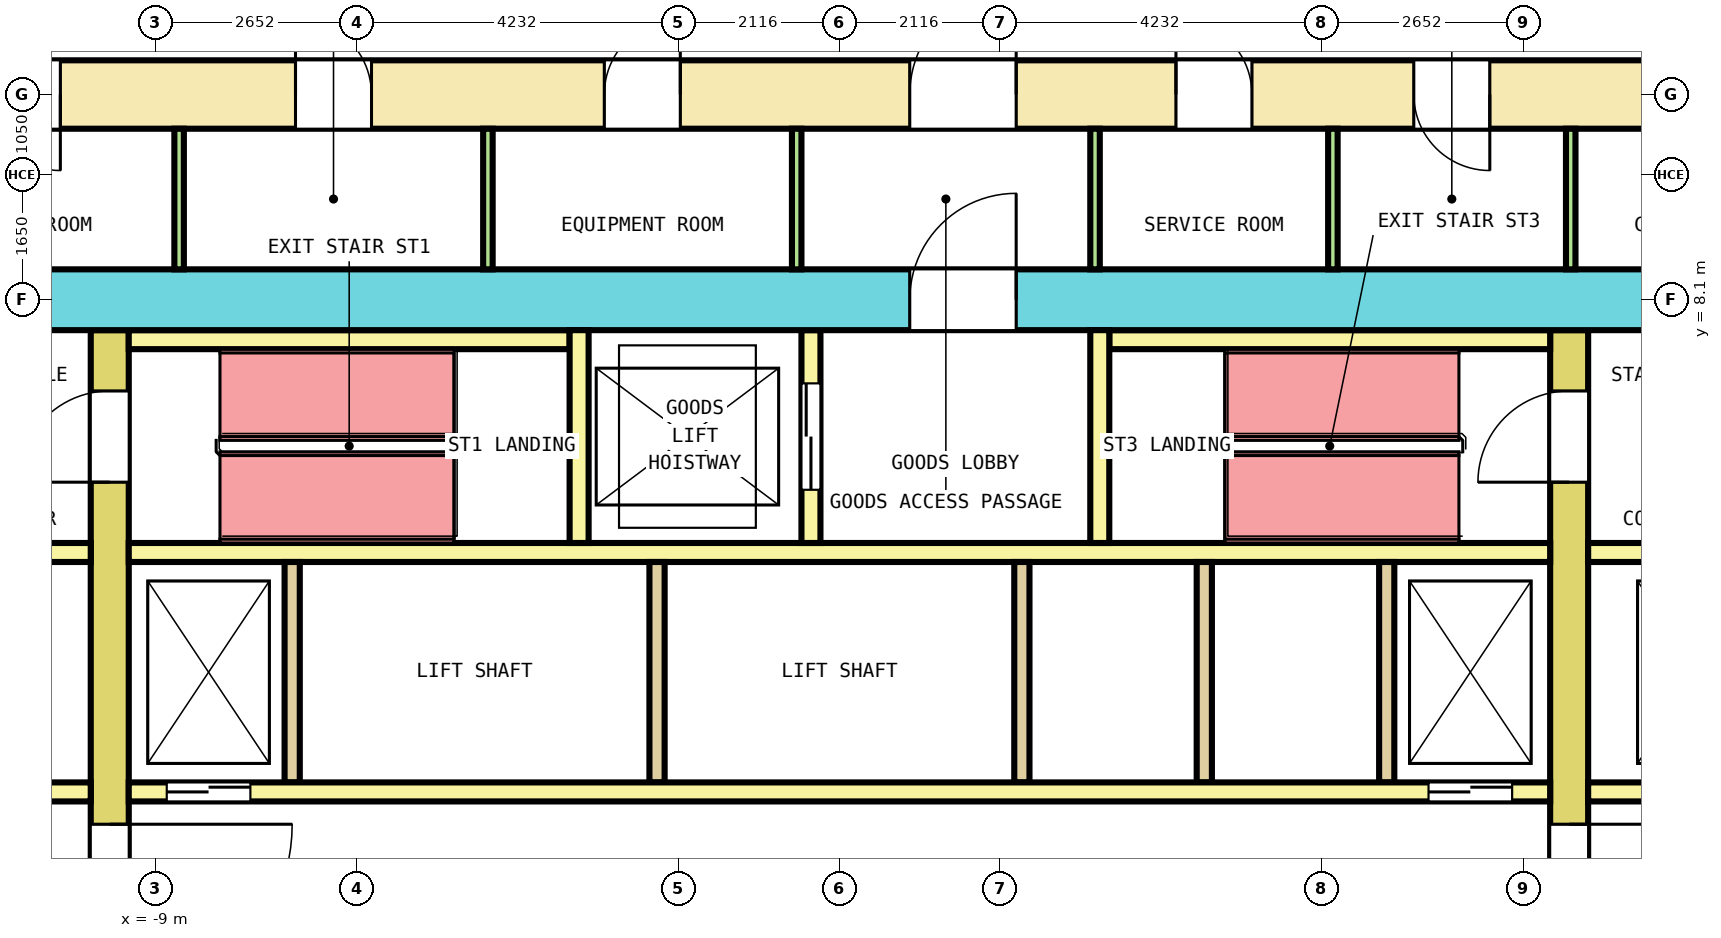
"""IFC4 building model, lengths in metres.
Left out: names, types, materials, properties, quantities, classifications, styles, units other than length and angle.
Written with IfcOpenShell. Run it as: python <this file> out.ifc"""

import sys

from ifc_helpers import new_model, si_unit, direction, frame, frame_2d, origin, place, context, subcontext, project, spatial, rectangle, extrude, element, fill, save


model = new_model("IFC4")
c1 = context("Model", 3, precision=1e-05, world=origin(), true_north=direction((0.0, 1.0)))
c2 = subcontext(c1, "Body", "Model", "MODEL_VIEW")
j1 = project(units=[si_unit("LENGTHUNIT", "METRE"), si_unit("PLANEANGLEUNIT", "RADIAN")], contexts=[c1])
p1 = place(None, origin())
s1 = spatial("IfcSite", under=j1, at=p1, CompositionType="ELEMENT")
p2 = place(p1, origin())
s2 = spatial("IfcBuilding", under=s1, at=p2, CompositionType="ELEMENT")
p3 = place(p2, frame((0.0, 0.0, 58.6)))
s3 = spatial("IfcBuildingStorey", under=s2, at=p3, CompositionType="ELEMENT", Elevation=58.6)
p4 = place(p3, frame((-13.65, 10.8, 0.0), z_axis=(0.0, 0.0, 1.0), x_axis=(1.0, 0.0, 0.0)))
e1 = element("IfcWall", 1, at=p4, inside=s3, PredefinedType="SHEAR", context=c2, shape_type="SweptSolid", body=[
    extrude(rectangle(XDim=27.3, YDim=0.9, at=frame_2d((13.65, 0.0))), origin(), (0.0, 0.0, 1.0), 4.1),
])
p5 = place(p4, frame((2.4, 0.0, 0.0)))
e2 = element("IfcOpeningElement", 2, at=p5, cuts=e1, PredefinedType="OPENING", context=c2, shape_type="SweptSolid", body=[
    extrude(rectangle(XDim=1.0, YDim=2.1, at=frame_2d((0.5, 1.05))), frame((0.0, 0.46, 0.0), z_axis=(0.0, -1.0, 0.0), x_axis=(1.0, 0.0, 0.0)), (0.0, 0.0, 1.0), 0.92),
])
p6 = place(p4, frame((6.494, 0.0, 0.0)))
e3 = element("IfcOpeningElement", 3, at=p6, cuts=e1, PredefinedType="OPENING", context=c2, shape_type="SweptSolid", body=[
    extrude(rectangle(XDim=1.0, YDim=2.1, at=frame_2d((0.5, 1.05))), frame((0.0, 0.46, 0.0), z_axis=(0.0, -1.0, 0.0), x_axis=(1.0, 0.0, 0.0)), (0.0, 0.0, 1.0), 0.92),
])
p7 = place(p4, frame((10.556, 0.0, 0.0)))
e4 = element("IfcOpeningElement", 4, at=p7, cuts=e1, PredefinedType="OPENING", context=c2, shape_type="SweptSolid", body=[
    extrude(rectangle(XDim=1.0, YDim=2.1, at=frame_2d((0.5, 1.05))), frame((0.0, 0.46, 0.0), z_axis=(0.0, -1.0, 0.0), x_axis=(1.0, 0.0, 0.0)), (0.0, 0.0, 1.0), 0.92),
])
p8 = place(p4, frame((18.077, 0.0, 0.0)))
e5 = element("IfcOpeningElement", 5, at=p8, cuts=e1, PredefinedType="OPENING", context=c2, shape_type="SweptSolid", body=[
    extrude(rectangle(XDim=1.0, YDim=2.1, at=frame_2d((0.5, 1.05))), frame((0.0, 0.46, 0.0), z_axis=(0.0, -1.0, 0.0), x_axis=(1.0, 0.0, 0.0)), (0.0, 0.0, 1.0), 0.92),
])
p9 = place(p4, frame((21.206, 0.0, 0.0)))
e6 = element("IfcOpeningElement", 6, at=p9, cuts=e1, PredefinedType="OPENING", context=c2, shape_type="SweptSolid", body=[
    extrude(rectangle(XDim=1.0, YDim=2.1, at=frame_2d((0.5, 1.05))), frame((0.0, 0.46, 0.0), z_axis=(0.0, -1.0, 0.0), x_axis=(1.0, 0.0, 0.0)), (0.0, 0.0, 1.0), 0.92),
])
p10 = place(p4, frame((24.367, 0.0, 0.0)))
e7 = element("IfcOpeningElement", 7, at=p10, cuts=e1, PredefinedType="OPENING", context=c2, shape_type="SweptSolid", body=[
    extrude(rectangle(XDim=1.0, YDim=2.1, at=frame_2d((0.5, 1.05))), frame((0.0, 0.46, 0.0), z_axis=(0.0, -1.0, 0.0), x_axis=(1.0, 0.0, 0.0)), (0.0, 0.0, 1.0), 0.92),
])
p11 = place(p4, frame((14.575, 0.0, 0.0)))
e8 = element("IfcOpeningElement", 8, at=p11, cuts=e1, PredefinedType="OPENING", context=c2, shape_type="SweptSolid", body=[
    extrude(rectangle(XDim=1.4, YDim=2.1, at=frame_2d((0.7, 1.05))), frame((0.0, 0.46, 0.0), z_axis=(0.0, -1.0, 0.0), x_axis=(1.0, 0.0, 0.0)), (0.0, 0.0, 1.0), 0.92),
])
p12 = place(p3, frame((-12.75, 8.1, 0.0), z_axis=(0.0, 0.0, 1.0), x_axis=(1.0, 0.0, 0.0)))
e9 = element("IfcWall", 9, at=p12, inside=s3, PredefinedType="SHEAR", context=c2, shape_type="SweptSolid", body=[
    extrude(rectangle(XDim=25.5, YDim=0.8, at=frame_2d((12.75, 0.0))), origin(), (0.0, 0.0, 1.0), 4.1),
])
p13 = place(p12, frame((13.675, 0.0, 0.0)))
e10 = element("IfcOpeningElement", 10, at=p13, cuts=e9, PredefinedType="OPENING", context=c2, shape_type="SweptSolid", body=[
    extrude(rectangle(XDim=1.4, YDim=2.1, at=frame_2d((0.7, 1.05))), frame((0.0, 0.41, 0.0), z_axis=(0.0, -1.0, 0.0), x_axis=(1.0, 0.0, 0.0)), (0.0, 0.0, 1.0), 0.82),
])
p14 = place(p3, frame((-9.6, -7.7, 0.0), z_axis=(0.0, 0.0, 1.0), x_axis=(0.0, 1.0, 0.0)))
e11 = element("IfcWall", 11, at=p14, inside=s3, PredefinedType="SHEAR", context=c2, shape_type="SweptSolid", body=[
    extrude(rectangle(XDim=15.4, YDim=0.5, at=frame_2d((7.7, 0.0))), origin(), (0.0, 0.0, 1.0), 4.1),
])
p15 = place(p14, frame((6.5, 0.0, 0.0)))
e12 = element("IfcOpeningElement", 12, at=p15, cuts=e11, PredefinedType="OPENING", context=c2, shape_type="SweptSolid", body=[
    extrude(rectangle(XDim=2.4, YDim=2.1, at=frame_2d((1.2, 1.05))), frame((0.0, 0.26, 0.0), z_axis=(0.0, -1.0, 0.0), x_axis=(1.0, 0.0, 0.0)), (0.0, 0.0, 1.0), 0.52),
])
p16 = place(p14, frame((13.4, 0.0, 0.0)))
e13 = element("IfcOpeningElement", 13, at=p16, cuts=e11, PredefinedType="OPENING", context=c2, shape_type="SweptSolid", body=[
    extrude(rectangle(XDim=1.2, YDim=2.1, at=frame_2d((0.6, 1.05))), frame((0.0, 0.26, 0.0), z_axis=(0.0, -1.0, 0.0), x_axis=(1.0, 0.0, 0.0)), (0.0, 0.0, 1.0), 0.52),
])
p17 = place(p14, frame((0.8, 0.0, 0.0)))
e14 = element("IfcOpeningElement", 14, at=p17, cuts=e11, PredefinedType="OPENING", context=c2, shape_type="SweptSolid", body=[
    extrude(rectangle(XDim=1.2, YDim=2.1, at=frame_2d((0.6, 1.05))), frame((0.0, 0.26, 0.0), z_axis=(0.0, -1.0, 0.0), x_axis=(1.0, 0.0, 0.0)), (0.0, 0.0, 1.0), 0.52),
])
p18 = place(p3, frame((9.6, -7.7, 0.0), z_axis=(0.0, 0.0, 1.0), x_axis=(0.0, 1.0, 0.0)))
e15 = element("IfcWall", 15, at=p18, inside=s3, PredefinedType="SHEAR", context=c2, shape_type="SweptSolid", body=[
    extrude(rectangle(XDim=15.4, YDim=0.5, at=frame_2d((7.7, 0.0))), origin(), (0.0, 0.0, 1.0), 4.1),
])
p19 = place(p18, frame((6.5, 0.0, 0.0)))
e16 = element("IfcOpeningElement", 16, at=p19, cuts=e15, PredefinedType="OPENING", context=c2, shape_type="SweptSolid", body=[
    extrude(rectangle(XDim=2.4, YDim=2.1, at=frame_2d((1.2, 1.05))), frame((0.0, 0.26, 0.0), z_axis=(0.0, -1.0, 0.0), x_axis=(1.0, 0.0, 0.0)), (0.0, 0.0, 1.0), 0.52),
])
p20 = place(p18, frame((13.4, 0.0, 0.0)))
e17 = element("IfcOpeningElement", 17, at=p20, cuts=e15, PredefinedType="OPENING", context=c2, shape_type="SweptSolid", body=[
    extrude(rectangle(XDim=1.2, YDim=2.1, at=frame_2d((0.6, 1.05))), frame((0.0, 0.26, 0.0), z_axis=(0.0, -1.0, 0.0), x_axis=(1.0, 0.0, 0.0)), (0.0, 0.0, 1.0), 0.52),
])
p21 = place(p18, frame((0.9, 0.0, 0.0)))
e18 = element("IfcOpeningElement", 18, at=p21, cuts=e15, PredefinedType="OPENING", context=c2, shape_type="SweptSolid", body=[
    extrude(rectangle(XDim=1.0, YDim=2.1, at=frame_2d((0.5, 1.05))), frame((0.0, 0.26, 0.0), z_axis=(0.0, -1.0, 0.0), x_axis=(1.0, 0.0, 0.0)), (0.0, 0.0, 1.0), 0.52),
])
p22 = place(p3, frame((-12.75, 1.625, 0.0), z_axis=(0.0, 0.0, 1.0), x_axis=(1.0, 0.0, 0.0)))
e19 = element("IfcWall", 19, at=p22, inside=s3, PredefinedType="SOLIDWALL", context=c2, shape_type="SweptSolid", body=[
    extrude(rectangle(XDim=2.9, YDim=0.25, at=frame_2d((1.45, 0.0))), origin(), (0.0, 0.0, 1.0), 4.1),
])
p23 = place(p22, frame((0.9, 0.0, 0.0)))
e20 = element("IfcOpeningElement", 20, at=p23, cuts=e19, PredefinedType="OPENING", context=c2, shape_type="SweptSolid", body=[
    extrude(rectangle(XDim=1.1, YDim=2.1, at=frame_2d((0.55, 1.05))), frame((0.0, 0.135, 0.0), z_axis=(0.0, -1.0, 0.0), x_axis=(1.0, 0.0, 0.0)), (0.0, 0.0, 1.0), 0.27),
])
p24 = place(p3, frame((-9.35, 1.625, 0.0), z_axis=(0.0, 0.0, 1.0), x_axis=(1.0, 0.0, 0.0)))
e21 = element("IfcWall", 21, at=p24, inside=s3, PredefinedType="SOLIDWALL", context=c2, shape_type="SweptSolid", body=[
    extrude(rectangle(XDim=18.7, YDim=0.25, at=frame_2d((9.35, 0.0))), origin(), (0.0, 0.0, 1.0), 4.1),
])
p25 = place(p24, frame((0.5, 0.0, 0.0)))
e22 = element("IfcOpeningElement", 22, at=p25, cuts=e21, PredefinedType="OPENING", context=c2, shape_type="SweptSolid", body=[
    extrude(rectangle(XDim=1.1, YDim=2.1, at=frame_2d((0.55, 1.05))), frame((0.0, 0.135, 0.0), z_axis=(0.0, -1.0, 0.0), x_axis=(1.0, 0.0, 0.0)), (0.0, 0.0, 1.0), 0.27),
])
p26 = place(p24, frame((17.1, 0.0, 0.0)))
e23 = element("IfcOpeningElement", 23, at=p26, cuts=e21, PredefinedType="OPENING", context=c2, shape_type="SweptSolid", body=[
    extrude(rectangle(XDim=1.1, YDim=2.1, at=frame_2d((0.55, 1.05))), frame((0.0, 0.135, 0.0), z_axis=(0.0, -1.0, 0.0), x_axis=(1.0, 0.0, 0.0)), (0.0, 0.0, 1.0), 0.27),
])
p27 = place(p3, frame((9.85, 1.625, 0.0), z_axis=(0.0, 0.0, 1.0), x_axis=(1.0, 0.0, 0.0)))
e24 = element("IfcWall", 24, at=p27, inside=s3, PredefinedType="SOLIDWALL", context=c2, shape_type="SweptSolid", body=[
    extrude(rectangle(XDim=2.9, YDim=0.25, at=frame_2d((1.45, 0.0))), origin(), (0.0, 0.0, 1.0), 4.1),
])
p28 = place(p27, frame((0.9, 0.0, 0.0)))
e25 = element("IfcOpeningElement", 25, at=p28, cuts=e24, PredefinedType="OPENING", context=c2, shape_type="SweptSolid", body=[
    extrude(rectangle(XDim=1.1, YDim=2.1, at=frame_2d((0.55, 1.05))), frame((0.0, 0.135, 0.0), z_axis=(0.0, -1.0, 0.0), x_axis=(1.0, 0.0, 0.0)), (0.0, 0.0, 1.0), 0.27),
])
p29 = place(p3, frame((-12.75, 4.775, 0.0), z_axis=(0.0, 0.0, 1.0), x_axis=(1.0, 0.0, 0.0)))
e26 = element("IfcWall", 26, at=p29, inside=s3, PredefinedType="SOLIDWALL", context=c2, shape_type="SweptSolid", body=[
    extrude(rectangle(XDim=2.9, YDim=0.25, at=frame_2d((1.45, 0.0))), origin(), (0.0, 0.0, 1.0), 4.1),
])
p30 = place(p3, frame((-9.35, 4.775, 0.0), z_axis=(0.0, 0.0, 1.0), x_axis=(1.0, 0.0, 0.0)))
e27 = element("IfcWall", 27, at=p30, inside=s3, PredefinedType="SOLIDWALL", context=c2, shape_type="SweptSolid", body=[
    extrude(rectangle(XDim=18.7, YDim=0.25, at=frame_2d((9.35, 0.0))), origin(), (0.0, 0.0, 1.0), 4.1),
])
p31 = place(p3, frame((9.85, 4.775, 0.0), z_axis=(0.0, 0.0, 1.0), x_axis=(1.0, 0.0, 0.0)))
e28 = element("IfcWall", 28, at=p31, inside=s3, PredefinedType="SOLIDWALL", context=c2, shape_type="SweptSolid", body=[
    extrude(rectangle(XDim=2.9, YDim=0.25, at=frame_2d((1.45, 0.0))), origin(), (0.0, 0.0, 1.0), 4.1),
])
for number, where, z_axis, x_axis in (
    (29, (-7.2, 1.75, 0.0), (0.0, 0.0, 1.0), (0.0, 1.0, 0.0)),
    (30, (-2.4, 1.75, 0.0), (0.0, 0.0, 1.0), (0.0, 1.0, 0.0)),
    (31, (2.4, 1.75, 0.0), (0.0, 0.0, 1.0), (0.0, 1.0, 0.0)),
    (32, (4.8, 1.75, 0.0), (0.0, 0.0, 1.0), (0.0, 1.0, 0.0)),
    (33, (7.2, 1.75, 0.0), (0.0, 0.0, 1.0), (0.0, 1.0, 0.0)),
):
    element("IfcWall", number, at=place(p3, frame(where, z_axis=z_axis, x_axis=x_axis)), inside=s3, PredefinedType="SOLIDWALL", context=c2, shape_type="SweptSolid", body=[
        extrude(rectangle(XDim=2.9, YDim=0.2, at=frame_2d((1.45, 0.0))), origin(), (0.0, 0.0, 1.0), 4.1),
    ])
for number, where, z_axis, x_axis in (
    (34, (-9.35, 7.575, 0.0), (0.0, 0.0, 1.0), (1.0, 0.0, 0.0)),
    (35, (3.55, 7.575, 0.0), (0.0, 0.0, 1.0), (1.0, 0.0, 0.0)),
):
    element("IfcWall", number, at=place(p3, frame(where, z_axis=z_axis, x_axis=x_axis)), inside=s3, PredefinedType="SOLIDWALL", context=c2, shape_type="SweptSolid", body=[
        extrude(rectangle(XDim=5.8, YDim=0.25, at=frame_2d((2.9, 0.0))), origin(), (0.0, 0.0, 1.0), 4.1),
    ])
p32 = place(p3, frame((-3.425, 4.9, 0.0), z_axis=(0.0, 0.0, 1.0), x_axis=(0.0, 1.0, 0.0)))
e36 = element("IfcWall", 36, at=p32, inside=s3, PredefinedType="SOLIDWALL", context=c2, shape_type="SweptSolid", body=[
    extrude(rectangle(XDim=2.8, YDim=0.25, at=frame_2d((1.4, 0.0))), origin(), (0.0, 0.0, 1.0), 4.1),
])
p33 = place(p3, frame((-0.375, 4.9, 0.0), z_axis=(0.0, 0.0, 1.0), x_axis=(0.0, 1.0, 0.0)))
e37 = element("IfcWall", 37, at=p33, inside=s3, PredefinedType="SOLIDWALL", context=c2, shape_type="SweptSolid", body=[
    extrude(rectangle(XDim=2.8, YDim=0.25, at=frame_2d((1.4, 0.0))), origin(), (0.0, 0.0, 1.0), 4.1),
])
p34 = place(p33, frame((0.7, 0.0, 0.0)))
e38 = element("IfcOpeningElement", 38, at=p34, cuts=e37, PredefinedType="OPENING", context=c2, shape_type="SweptSolid", body=[
    extrude(rectangle(XDim=1.4, YDim=2.1, at=frame_2d((0.7, 1.05))), frame((0.0, 0.135, 0.0), z_axis=(0.0, -1.0, 0.0), x_axis=(1.0, 0.0, 0.0)), (0.0, 0.0, 1.0), 0.27),
])
p35 = place(p3, frame((3.425, 4.9, 0.0), z_axis=(0.0, 0.0, 1.0), x_axis=(0.0, 1.0, 0.0)))
e39 = element("IfcWall", 39, at=p35, inside=s3, PredefinedType="SOLIDWALL", context=c2, shape_type="SweptSolid", body=[
    extrude(rectangle(XDim=2.8, YDim=0.25, at=frame_2d((1.4, 0.0))), origin(), (0.0, 0.0, 1.0), 4.1),
])
for number, where, z_axis, x_axis in (
    (40, (-8.688, 8.5, 0.0), (0.0, 0.0, 1.0), (0.0, 1.0, 0.0)),
    (41, (-4.625, 8.5, 0.0), (0.0, 0.0, 1.0), (0.0, 1.0, 0.0)),
    (42, (-0.562, 8.5, 0.0), (0.0, 0.0, 1.0), (0.0, 1.0, 0.0)),
    (43, (3.363, 8.5, 0.0), (0.0, 0.0, 1.0), (0.0, 1.0, 0.0)),
    (44, (6.492, 8.5, 0.0), (0.0, 0.0, 1.0), (0.0, 1.0, 0.0)),
    (45, (9.621, 8.5, 0.0), (0.0, 0.0, 1.0), (0.0, 1.0, 0.0)),
):
    element("IfcWall", number, at=place(p3, frame(where, z_axis=z_axis, x_axis=x_axis)), inside=s3, PredefinedType="PARTITIONING", context=c2, shape_type="SweptSolid", body=[
        extrude(rectangle(XDim=1.85, YDim=0.125, at=frame_2d((0.925, 0.0))), origin(), (0.0, 0.0, 1.0), 4.1),
    ])
p36 = place(p25, origin())
e46 = element("IfcDoor", 46, at=p36, inside=s3, OperationType="DOUBLE_DOOR_SLIDING", PredefinedType="DOOR", context=c2, shape_type="SweptSolid", body=[
    extrude(rectangle(XDim=1.1, YDim=2.1, at=frame_2d((0.55, 1.05))), frame((0.0, 0.075, 0.0), z_axis=(0.0, -1.0, 0.0), x_axis=(1.0, 0.0, 0.0)), (0.0, 0.0, 1.0), 0.15),
])
fill(e22, e46)
p37 = place(p26, origin())
e47 = element("IfcDoor", 47, at=p37, inside=s3, OperationType="DOUBLE_DOOR_SLIDING", PredefinedType="DOOR", context=c2, shape_type="SweptSolid", body=[
    extrude(rectangle(XDim=1.1, YDim=2.1, at=frame_2d((0.55, 1.05))), frame((0.0, 0.075, 0.0), z_axis=(0.0, -1.0, 0.0), x_axis=(1.0, 0.0, 0.0)), (0.0, 0.0, 1.0), 0.15),
])
fill(e23, e47)
p38 = place(p34, origin())
e48 = element("IfcDoor", 48, at=p38, inside=s3, OperationType="DOUBLE_DOOR_SLIDING", PredefinedType="DOOR", context=c2, shape_type="SweptSolid", body=[
    extrude(rectangle(XDim=1.4, YDim=2.1, at=frame_2d((0.7, 1.05))), frame((0.0, 0.075, 0.0), z_axis=(0.0, -1.0, 0.0), x_axis=(1.0, 0.0, 0.0)), (0.0, 0.0, 1.0), 0.15),
])
fill(e38, e48)
p39 = place(p15, origin())
e49 = element("IfcDoor", 49, at=p39, inside=s3, OperationType="DOUBLE_DOOR_SINGLE_SWING", PredefinedType="DOOR", context=c2, shape_type="SweptSolid", body=[
    extrude(rectangle(XDim=2.4, YDim=2.1, at=frame_2d((1.2, 1.05))), frame((0.0, 0.2, 0.0), z_axis=(0.0, -1.0, 0.0), x_axis=(1.0, 0.0, 0.0)), (0.0, 0.0, 1.0), 0.4),
])
fill(e12, e49)
p40 = place(p19, origin())
e50 = element("IfcDoor", 50, at=p40, inside=s3, OperationType="DOUBLE_DOOR_SINGLE_SWING", PredefinedType="DOOR", context=c2, shape_type="SweptSolid", body=[
    extrude(rectangle(XDim=2.4, YDim=2.1, at=frame_2d((1.2, 1.05))), frame((0.0, 0.2, 0.0), z_axis=(0.0, -1.0, 0.0), x_axis=(1.0, 0.0, 0.0)), (0.0, 0.0, 1.0), 0.4),
])
fill(e16, e50)
p41 = place(p16, origin())
e51 = element("IfcDoor", 51, at=p41, inside=s3, OperationType="SINGLE_SWING_LEFT", PredefinedType="DOOR", context=c2, shape_type="SweptSolid", body=[
    extrude(rectangle(XDim=1.2, YDim=2.1, at=frame_2d((0.6, 1.05))), frame((0.0, 0.2, 0.0), z_axis=(0.0, -1.0, 0.0), x_axis=(1.0, 0.0, 0.0)), (0.0, 0.0, 1.0), 0.4),
])
fill(e13, e51)
p42 = place(p20, origin())
e52 = element("IfcDoor", 52, at=p42, inside=s3, OperationType="SINGLE_SWING_LEFT", PredefinedType="DOOR", context=c2, shape_type="SweptSolid", body=[
    extrude(rectangle(XDim=1.2, YDim=2.1, at=frame_2d((0.6, 1.05))), frame((0.0, 0.2, 0.0), z_axis=(0.0, -1.0, 0.0), x_axis=(1.0, 0.0, 0.0)), (0.0, 0.0, 1.0), 0.4),
])
fill(e17, e52)
p43 = place(p13, origin())
e53 = element("IfcDoor", 53, at=p43, inside=s3, OperationType="DOUBLE_DOOR_SINGLE_SWING", PredefinedType="DOOR", context=c2, shape_type="SweptSolid", body=[
    extrude(rectangle(XDim=1.4, YDim=2.1, at=frame_2d((0.7, 1.05))), frame((0.0, 0.3, 0.0), z_axis=(0.0, -1.0, 0.0), x_axis=(1.0, 0.0, 0.0)), (0.0, 0.0, 1.0), 0.6),
])
fill(e10, e53)
p44 = place(p5, origin())
e54 = element("IfcDoor", 54, at=p44, inside=s3, OperationType="SINGLE_SWING_RIGHT", PredefinedType="DOOR", context=c2, shape_type="SweptSolid", body=[
    extrude(rectangle(XDim=1.0, YDim=2.1, at=frame_2d((0.5, 1.05))), frame((0.0, 0.3, 0.0), z_axis=(0.0, -1.0, 0.0), x_axis=(1.0, 0.0, 0.0)), (0.0, 0.0, 1.0), 0.6),
])
fill(e2, e54)
p45 = place(p6, origin())
e55 = element("IfcDoor", 55, at=p45, inside=s3, OperationType="SINGLE_SWING_LEFT", PredefinedType="DOOR", context=c2, shape_type="SweptSolid", body=[
    extrude(rectangle(XDim=1.0, YDim=2.1, at=frame_2d((0.5, 1.05))), frame((0.0, 0.3, 0.0), z_axis=(0.0, -1.0, 0.0), x_axis=(1.0, 0.0, 0.0)), (0.0, 0.0, 1.0), 0.6),
])
fill(e3, e55)
p46 = place(p7, origin())
e56 = element("IfcDoor", 56, at=p46, inside=s3, OperationType="SINGLE_SWING_RIGHT", PredefinedType="DOOR", context=c2, shape_type="SweptSolid", body=[
    extrude(rectangle(XDim=1.0, YDim=2.1, at=frame_2d((0.5, 1.05))), frame((0.0, 0.3, 0.0), z_axis=(0.0, -1.0, 0.0), x_axis=(1.0, 0.0, 0.0)), (0.0, 0.0, 1.0), 0.6),
])
fill(e4, e56)
p47 = place(p8, origin())
e57 = element("IfcDoor", 57, at=p47, inside=s3, OperationType="SINGLE_SWING_LEFT", PredefinedType="DOOR", context=c2, shape_type="SweptSolid", body=[
    extrude(rectangle(XDim=1.0, YDim=2.1, at=frame_2d((0.5, 1.05))), frame((0.0, 0.3, 0.0), z_axis=(0.0, -1.0, 0.0), x_axis=(1.0, 0.0, 0.0)), (0.0, 0.0, 1.0), 0.6),
])
fill(e5, e57)
p48 = place(p9, origin())
e58 = element("IfcDoor", 58, at=p48, inside=s3, OperationType="SINGLE_SWING_RIGHT", PredefinedType="DOOR", context=c2, shape_type="SweptSolid", body=[
    extrude(rectangle(XDim=1.0, YDim=2.1, at=frame_2d((0.5, 1.05))), frame((0.0, 0.3, 0.0), z_axis=(0.0, -1.0, 0.0), x_axis=(1.0, 0.0, 0.0)), (0.0, 0.0, 1.0), 0.6),
])
fill(e6, e58)
p49 = place(p11, origin())
e59 = element("IfcDoor", 59, at=p49, inside=s3, OperationType="DOUBLE_DOOR_SINGLE_SWING", PredefinedType="DOOR", context=c2, shape_type="SweptSolid", body=[
    extrude(rectangle(XDim=1.4, YDim=2.1, at=frame_2d((0.7, 1.05))), frame((0.0, 0.3, 0.0), z_axis=(0.0, -1.0, 0.0), x_axis=(1.0, 0.0, 0.0)), (0.0, 0.0, 1.0), 0.6),
])
fill(e8, e59)
save(model, sys.argv[1])
